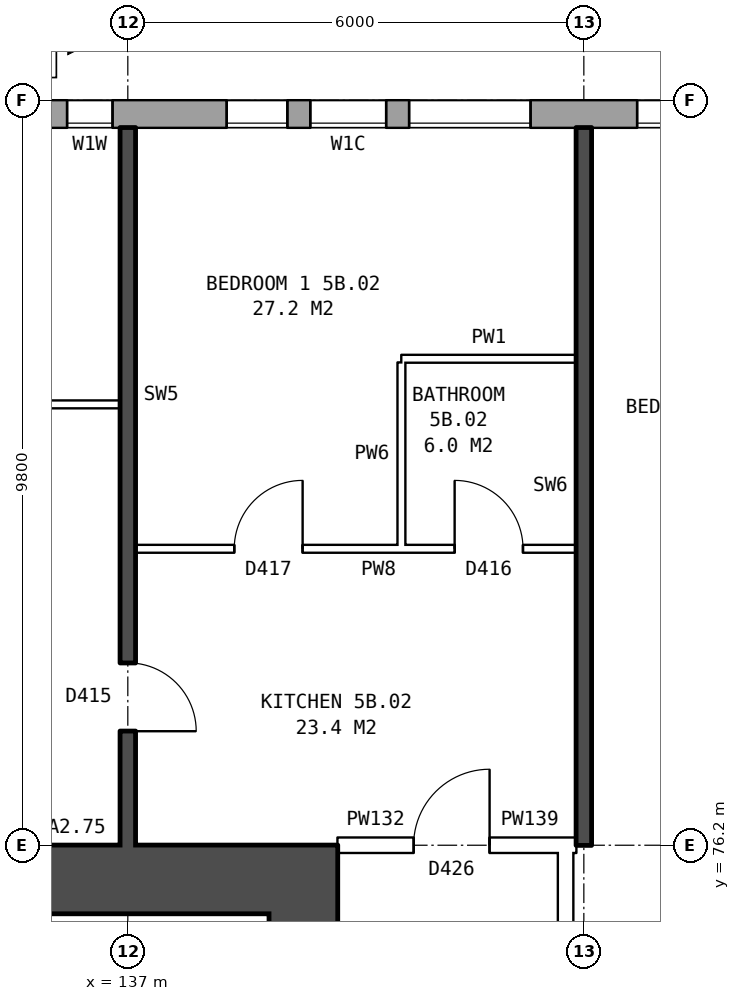
"""IFC4 building model, lengths in metres.
Left out: names, types, materials, properties, quantities, classifications, styles, units other than length and angle.
Written with IfcOpenShell. Run it as: python <this file> out.ifc"""

import sys

from ifc_helpers import new_model, si_unit, direction, frame, frame_2d, origin, place, context, subcontext, project, spatial, rectangle, extrude, element, fill, save


model = new_model("IFC4")
c1 = context("Model", 3, precision=1e-05, world=origin(), true_north=direction((0.0, 1.0)))
c2 = subcontext(c1, "Body", "Model", "MODEL_VIEW")
j1 = project(units=[si_unit("LENGTHUNIT", "METRE"), si_unit("PLANEANGLEUNIT", "RADIAN")], contexts=[c1])
p1 = place(None, origin())
s1 = spatial("IfcSite", under=j1, at=p1, CompositionType="ELEMENT")
p2 = place(p1, origin())
s2 = spatial("IfcBuilding", under=s1, at=p2, CompositionType="ELEMENT")
p3 = place(p2, frame((0.0, 0.0, 22.6)))
s3 = spatial("IfcBuildingStorey", under=s2, at=p3, CompositionType="ELEMENT", Elevation=22.6)
p4 = place(p3, frame((174.675, 85.82, 0.0), z_axis=(0.0, 0.0, 1.0), x_axis=(-1.0, 0.0, 0.0)))
e1 = element("IfcWall", 1, at=p4, inside=s3, PredefinedType="STANDARD", context=c2, shape_type="SweptSolid", body=[
    extrude(rectangle(XDim=40.601, YDim=0.36, at=frame_2d((20.3, 0.0))), origin(), (0.0, 0.0, 1.0), 2.85),
])
p5 = place(p4, frame((1.875, 0.0, 1.7)))
e2 = element("IfcOpeningElement", 2, at=p5, cuts=e1, PredefinedType="OPENING", context=c2, shape_type="SweptSolid", body=[
    extrude(rectangle(XDim=1.0, YDim=0.9, at=frame_2d((0.5, 0.45))), frame((0.0, 0.19, 0.0), z_axis=(0.0, -1.0, 0.0), x_axis=(1.0, 0.0, 0.0)), (0.0, 0.0, 1.0), 0.38),
])
p6 = place(p4, frame((5.375, 0.0, 0.8)))
e3 = element("IfcOpeningElement", 3, at=p6, cuts=e1, PredefinedType="OPENING", context=c2, shape_type="SweptSolid", body=[
    extrude(rectangle(XDim=1.6, YDim=1.8, at=frame_2d((0.8, 0.9))), frame((0.0, 0.19, 0.0), z_axis=(0.0, -1.0, 0.0), x_axis=(1.0, 0.0, 0.0)), (0.0, 0.0, 1.0), 0.38),
])
p7 = place(p4, frame((8.375, 0.0, 0.8)))
e4 = element("IfcOpeningElement", 4, at=p7, cuts=e1, PredefinedType="OPENING", context=c2, shape_type="SweptSolid", body=[
    extrude(rectangle(XDim=1.6, YDim=1.8, at=frame_2d((0.8, 0.9))), frame((0.0, 0.19, 0.0), z_axis=(0.0, -1.0, 0.0), x_axis=(1.0, 0.0, 0.0)), (0.0, 0.0, 1.0), 0.38),
])
p8 = place(p4, frame((11.375, 0.0, 0.8)))
e5 = element("IfcOpeningElement", 5, at=p8, cuts=e1, PredefinedType="OPENING", context=c2, shape_type="SweptSolid", body=[
    extrude(rectangle(XDim=1.6, YDim=1.8, at=frame_2d((0.8, 0.9))), frame((0.0, 0.19, 0.0), z_axis=(0.0, -1.0, 0.0), x_axis=(1.0, 0.0, 0.0)), (0.0, 0.0, 1.0), 0.38),
])
p9 = place(p4, frame((14.375, 0.0, 0.8)))
e6 = element("IfcOpeningElement", 6, at=p9, cuts=e1, PredefinedType="OPENING", context=c2, shape_type="SweptSolid", body=[
    extrude(rectangle(XDim=1.6, YDim=1.8, at=frame_2d((0.8, 0.9))), frame((0.0, 0.19, 0.0), z_axis=(0.0, -1.0, 0.0), x_axis=(1.0, 0.0, 0.0)), (0.0, 0.0, 1.0), 0.38),
])
p10 = place(p4, frame((17.375, 0.0, 0.8)))
e7 = element("IfcOpeningElement", 7, at=p10, cuts=e1, PredefinedType="OPENING", context=c2, shape_type="SweptSolid", body=[
    extrude(rectangle(XDim=1.6, YDim=1.8, at=frame_2d((0.8, 0.9))), frame((0.0, 0.19, 0.0), z_axis=(0.0, -1.0, 0.0), x_axis=(1.0, 0.0, 0.0)), (0.0, 0.0, 1.0), 0.38),
])
p11 = place(p4, frame((20.375, 0.0, 0.8)))
e8 = element("IfcOpeningElement", 8, at=p11, cuts=e1, PredefinedType="OPENING", context=c2, shape_type="SweptSolid", body=[
    extrude(rectangle(XDim=1.6, YDim=1.8, at=frame_2d((0.8, 0.9))), frame((0.0, 0.19, 0.0), z_axis=(0.0, -1.0, 0.0), x_axis=(1.0, 0.0, 0.0)), (0.0, 0.0, 1.0), 0.38),
])
p12 = place(p4, frame((23.375, 0.0, 0.8)))
e9 = element("IfcOpeningElement", 9, at=p12, cuts=e1, PredefinedType="OPENING", context=c2, shape_type="SweptSolid", body=[
    extrude(rectangle(XDim=1.6, YDim=1.8, at=frame_2d((0.8, 0.9))), frame((0.0, 0.19, 0.0), z_axis=(0.0, -1.0, 0.0), x_axis=(1.0, 0.0, 0.0)), (0.0, 0.0, 1.0), 0.38),
])
p13 = place(p4, frame((26.375, 0.0, 0.8)))
e10 = element("IfcOpeningElement", 10, at=p13, cuts=e1, PredefinedType="OPENING", context=c2, shape_type="SweptSolid", body=[
    extrude(rectangle(XDim=1.6, YDim=1.8, at=frame_2d((0.8, 0.9))), frame((0.0, 0.19, 0.0), z_axis=(0.0, -1.0, 0.0), x_axis=(1.0, 0.0, 0.0)), (0.0, 0.0, 1.0), 0.38),
])
p14 = place(p4, frame((29.375, 0.0, 0.8)))
e11 = element("IfcOpeningElement", 11, at=p14, cuts=e1, PredefinedType="OPENING", context=c2, shape_type="SweptSolid", body=[
    extrude(rectangle(XDim=1.6, YDim=1.8, at=frame_2d((0.8, 0.9))), frame((0.0, 0.19, 0.0), z_axis=(0.0, -1.0, 0.0), x_axis=(1.0, 0.0, 0.0)), (0.0, 0.0, 1.0), 0.38),
])
p15 = place(p4, frame((32.375, 0.0, 0.8)))
e12 = element("IfcOpeningElement", 12, at=p15, cuts=e1, PredefinedType="OPENING", context=c2, shape_type="SweptSolid", body=[
    extrude(rectangle(XDim=1.6, YDim=1.8, at=frame_2d((0.8, 0.9))), frame((0.0, 0.19, 0.0), z_axis=(0.0, -1.0, 0.0), x_axis=(1.0, 0.0, 0.0)), (0.0, 0.0, 1.0), 0.38),
])
p16 = place(p4, frame((34.275, 0.0, 0.8)))
e13 = element("IfcOpeningElement", 13, at=p16, cuts=e1, PredefinedType="OPENING", context=c2, shape_type="SweptSolid", body=[
    extrude(rectangle(XDim=1.0, YDim=1.8, at=frame_2d((0.5, 0.9))), frame((0.0, 0.19, 0.0), z_axis=(0.0, -1.0, 0.0), x_axis=(1.0, 0.0, 0.0)), (0.0, 0.0, 1.0), 0.38),
])
p17 = place(p4, frame((37.875, 0.0, 1.6)))
e14 = element("IfcOpeningElement", 14, at=p17, cuts=e1, PredefinedType="OPENING", context=c2, shape_type="SweptSolid", body=[
    extrude(rectangle(XDim=0.6, YDim=0.9, at=frame_2d((0.3, 0.45))), frame((0.0, 0.19, 0.0), z_axis=(0.0, -1.0, 0.0), x_axis=(1.0, 0.0, 0.0)), (0.0, 0.0, 1.0), 0.38),
])
p18 = place(p4, frame((4.125, 0.0, 0.8)))
e15 = element("IfcOpeningElement", 15, at=p18, cuts=e1, PredefinedType="OPENING", context=c2, shape_type="SweptSolid", body=[
    extrude(rectangle(XDim=0.8, YDim=0.9, at=frame_2d((0.4, 0.45))), frame((0.0, 0.19, 0.0), z_axis=(0.0, -1.0, 0.0), x_axis=(1.0, 0.0, 0.0)), (0.0, 0.0, 1.0), 0.38),
])
p19 = place(p4, frame((35.575, 0.0, 0.8)))
e16 = element("IfcOpeningElement", 16, at=p19, cuts=e1, PredefinedType="OPENING", context=c2, shape_type="SweptSolid", body=[
    extrude(rectangle(XDim=0.8, YDim=0.9, at=frame_2d((0.4, 0.45))), frame((0.0, 0.19, 0.0), z_axis=(0.0, -1.0, 0.0), x_axis=(1.0, 0.0, 0.0)), (0.0, 0.0, 1.0), 0.38),
])
p20 = place(p4, frame((38.875, 0.0, 0.8)))
e17 = element("IfcOpeningElement", 17, at=p20, cuts=e1, PredefinedType="OPENING", context=c2, shape_type="SweptSolid", body=[
    extrude(rectangle(XDim=1.4, YDim=1.8, at=frame_2d((0.7, 0.9))), frame((0.0, 0.19, 0.0), z_axis=(0.0, -1.0, 0.0), x_axis=(1.0, 0.0, 0.0)), (0.0, 0.0, 1.0), 0.38),
])
p21 = place(p3, frame((139.31, 64.7, 0.0), z_axis=(0.0, 0.0, 1.0), x_axis=(0.0, 1.0, 0.0)))
e18 = element("IfcWall", 18, at=p21, inside=s3, PredefinedType="SHEAR", context=c2, shape_type="SweptSolid", body=[
    extrude(rectangle(XDim=10.6, YDim=0.9, at=frame_2d((5.3, 0.0))), origin(), (0.0, 0.0, 1.0), 2.85),
])
p22 = place(p21, frame((0.425, 0.0, 0.0)))
e19 = element("IfcOpeningElement", 19, at=p22, cuts=e18, PredefinedType="OPENING", context=c2, shape_type="SweptSolid", body=[
    extrude(rectangle(XDim=1.1, YDim=2.1, at=frame_2d((0.55, 1.05))), frame((0.0, 0.46, 0.0), z_axis=(0.0, -1.0, 0.0), x_axis=(1.0, 0.0, 0.0)), (0.0, 0.0, 1.0), 0.92),
])
p23 = place(p21, frame((9.0, 0.0, 0.0)))
e20 = element("IfcOpeningElement", 20, at=p23, cuts=e18, PredefinedType="OPENING", context=c2, shape_type="SweptSolid", body=[
    extrude(rectangle(XDim=1.1, YDim=2.1, at=frame_2d((0.55, 1.05))), frame((0.0, 0.46, 0.0), z_axis=(0.0, -1.0, 0.0), x_axis=(1.0, 0.0, 0.0)), (0.0, 0.0, 1.0), 0.92),
])
p24 = place(p21, frame((7.225, 0.0, 0.0)))
e21 = element("IfcOpeningElement", 21, at=p24, cuts=e18, PredefinedType="OPENING", context=c2, shape_type="SweptSolid", body=[
    extrude(rectangle(XDim=0.85, YDim=2.1, at=frame_2d((0.425, 1.05))), frame((0.0, 0.46, 0.0), z_axis=(0.0, -1.0, 0.0), x_axis=(1.0, 0.0, 0.0)), (0.0, 0.0, 1.0), 0.92),
])
p25 = place(p3, frame((139.76, 75.75, 0.0), z_axis=(0.0, 0.0, 1.0), x_axis=(-1.0, 0.0, 0.0)))
e22 = element("IfcWall", 22, at=p25, inside=s3, PredefinedType="SHEAR", context=c2, shape_type="SweptSolid", body=[
    extrude(rectangle(XDim=8.4, YDim=0.9, at=frame_2d((4.2, 0.0))), origin(), (0.0, 0.0, 1.0), 2.85),
])
p26 = place(p3, frame((142.76, 63.9, 0.0), z_axis=(0.0, 0.0, 1.0), x_axis=(0.0, 1.0, 0.0)))
e23 = element("IfcWall", 23, at=p26, inside=s3, PredefinedType="PARTITIONING", context=c2, shape_type="SweptSolid", body=[
    extrude(rectangle(XDim=12.2, YDim=0.2, at=frame_2d((6.1, 0.0))), origin(), (0.0, 0.0, 1.0), 2.85),
])
p27 = place(p26, frame((5.1, 0.0, 0.0)))
e24 = element("IfcOpeningElement", 24, at=p27, cuts=e23, PredefinedType="OPENING", context=c2, shape_type="SweptSolid", body=[
    extrude(rectangle(XDim=2.0, YDim=2.1, at=frame_2d((1.0, 1.05))), frame((0.0, 0.11, 0.0), z_axis=(0.0, -1.0, 0.0), x_axis=(1.0, 0.0, 0.0)), (0.0, 0.0, 1.0), 0.22),
])
p28 = place(p3, frame((139.76, 76.2, 0.0), z_axis=(0.0, 0.0, 1.0), x_axis=(1.0, 0.0, 0.0)))
e25 = element("IfcWall", 25, at=p28, inside=s3, PredefinedType="PARTITIONING", context=c2, shape_type="SweptSolid", body=[
    extrude(rectangle(XDim=3.0, YDim=0.2, at=frame_2d((1.5, 0.0))), origin(), (0.0, 0.0, 1.0), 2.85),
])
p29 = place(p28, frame((1.0, 0.0, 0.0)))
e26 = element("IfcOpeningElement", 26, at=p29, cuts=e25, PredefinedType="OPENING", context=c2, shape_type="SweptSolid", body=[
    extrude(rectangle(XDim=1.0, YDim=2.1, at=frame_2d((0.5, 1.05))), frame((0.0, 0.11, 0.0), z_axis=(0.0, -1.0, 0.0), x_axis=(1.0, 0.0, 0.0)), (0.0, 0.0, 1.0), 0.22),
])
p30 = place(p3, frame((142.76, 76.2, 0.0), z_axis=(0.0, 0.0, 1.0), x_axis=(1.0, 0.0, 0.0)))
e27 = element("IfcWall", 27, at=p30, inside=s3, PredefinedType="PARTITIONING", context=c2, shape_type="SweptSolid", body=[
    extrude(rectangle(XDim=0.14, YDim=0.2, at=frame_2d((0.07, 0.0))), origin(), (0.0, 0.0, 1.0), 2.85),
])
p31 = place(p3, frame((137.1, 80.1, 0.0), z_axis=(0.0, 0.0, 1.0), x_axis=(1.0, 0.0, 0.0)))
e28 = element("IfcWall", 28, at=p31, inside=s3, PredefinedType="PARTITIONING", context=c2, shape_type="SweptSolid", body=[
    extrude(rectangle(XDim=5.8, YDim=0.1, at=frame_2d((2.9, 0.0))), origin(), (0.0, 0.0, 1.0), 2.85),
])
p32 = place(p31, frame((1.3, 0.0, 0.0)))
e29 = element("IfcOpeningElement", 29, at=p32, cuts=e28, PredefinedType="OPENING", context=c2, shape_type="SweptSolid", body=[
    extrude(rectangle(XDim=0.9, YDim=2.1, at=frame_2d((0.45, 1.05))), frame((0.0, 0.06, 0.0), z_axis=(0.0, -1.0, 0.0), x_axis=(1.0, 0.0, 0.0)), (0.0, 0.0, 1.0), 0.12),
])
p33 = place(p31, frame((4.2, 0.0, 0.0)))
e30 = element("IfcOpeningElement", 30, at=p33, cuts=e28, PredefinedType="OPENING", context=c2, shape_type="SweptSolid", body=[
    extrude(rectangle(XDim=0.9, YDim=2.1, at=frame_2d((0.45, 1.05))), frame((0.0, 0.06, 0.0), z_axis=(0.0, -1.0, 0.0), x_axis=(1.0, 0.0, 0.0)), (0.0, 0.0, 1.0), 0.12),
])
p34 = place(p3, frame((131.36, 82.0, 0.0), z_axis=(0.0, 0.0, 1.0), x_axis=(1.0, 0.0, 0.0)))
e31 = element("IfcWall", 31, at=p34, inside=s3, PredefinedType="PARTITIONING", context=c2, shape_type="SweptSolid", body=[
    extrude(rectangle(XDim=5.54, YDim=0.1, at=frame_2d((2.77, 0.0))), origin(), (0.0, 0.0, 1.0), 2.85),
])
p35 = place(p34, frame((2.32, 0.0, 0.0)))
e32 = element("IfcOpeningElement", 32, at=p35, cuts=e31, PredefinedType="OPENING", context=c2, shape_type="SweptSolid", body=[
    extrude(rectangle(XDim=0.9, YDim=2.1, at=frame_2d((0.45, 1.05))), frame((0.0, 0.06, 0.0), z_axis=(0.0, -1.0, 0.0), x_axis=(1.0, 0.0, 0.0)), (0.0, 0.0, 1.0), 0.12),
])
p36 = place(p3, frame((140.6, 82.6, 0.0), z_axis=(0.0, 0.0, 1.0), x_axis=(1.0, 0.0, 0.0)))
e33 = element("IfcWall", 33, at=p36, inside=s3, PredefinedType="PARTITIONING", context=c2, shape_type="SweptSolid", body=[
    extrude(rectangle(XDim=2.3, YDim=0.1, at=frame_2d((1.15, 0.0))), origin(), (0.0, 0.0, 1.0), 2.85),
])
p37 = place(p3, frame((137.0, 76.2, 0.0), z_axis=(0.0, 0.0, 1.0), x_axis=(0.0, 1.0, 0.0)))
e34 = element("IfcWall", 34, at=p37, inside=s3, PredefinedType="SOLIDWALL", context=c2, shape_type="SweptSolid", body=[
    extrude(rectangle(XDim=9.44, YDim=0.2, at=frame_2d((4.72, 0.0))), origin(), (0.0, 0.0, 1.0), 2.85),
])
p38 = place(p37, frame((1.5, 0.0, 0.0)))
e35 = element("IfcOpeningElement", 35, at=p38, cuts=e34, PredefinedType="OPENING", context=c2, shape_type="SweptSolid", body=[
    extrude(rectangle(XDim=0.9, YDim=2.1, at=frame_2d((0.45, 1.05))), frame((0.0, 0.11, 0.0), z_axis=(0.0, -1.0, 0.0), x_axis=(1.0, 0.0, 0.0)), (0.0, 0.0, 1.0), 0.22),
])
p39 = place(p3, frame((140.6, 80.15, 0.0), z_axis=(0.0, 0.0, 1.0), x_axis=(0.0, 1.0, 0.0)))
e36 = element("IfcWall", 36, at=p39, inside=s3, PredefinedType="PARTITIONING", context=c2, shape_type="SweptSolid", body=[
    extrude(rectangle(XDim=2.4, YDim=0.1, at=frame_2d((1.2, 0.0))), origin(), (0.0, 0.0, 1.0), 2.85),
])
p40 = place(p3, frame((143.0, 76.2, 0.0), z_axis=(0.0, 0.0, 1.0), x_axis=(0.0, 1.0, 0.0)))
e37 = element("IfcWall", 37, at=p40, inside=s3, PredefinedType="SOLIDWALL", context=c2, shape_type="SweptSolid", body=[
    extrude(rectangle(XDim=9.44, YDim=0.2, at=frame_2d((4.72, 0.0))), origin(), (0.0, 0.0, 1.0), 2.85),
])
p41 = place(p14, origin())
e38 = element("IfcWindow", 38, at=p41, inside=s3, PartitioningType="SINGLE_PANEL", PredefinedType="WINDOW", context=c2, shape_type="SweptSolid", body=[
    extrude(rectangle(XDim=1.6, YDim=1.8, at=frame_2d((0.8, 0.9))), frame((0.0, 0.15, 0.0), z_axis=(0.0, -1.0, 0.0), x_axis=(1.0, 0.0, 0.0)), (0.0, 0.0, 1.0), 0.06),
])
fill(e11, e38)
p42 = place(p15, origin())
e39 = element("IfcWindow", 39, at=p42, inside=s3, PartitioningType="SINGLE_PANEL", PredefinedType="WINDOW", context=c2, shape_type="SweptSolid", body=[
    extrude(rectangle(XDim=1.6, YDim=1.8, at=frame_2d((0.8, 0.9))), frame((0.0, 0.15, 0.0), z_axis=(0.0, -1.0, 0.0), x_axis=(1.0, 0.0, 0.0)), (0.0, 0.0, 1.0), 0.06),
])
fill(e12, e39)
p43 = place(p16, origin())
e40 = element("IfcWindow", 40, at=p43, inside=s3, PartitioningType="SINGLE_PANEL", PredefinedType="WINDOW", context=c2, shape_type="SweptSolid", body=[
    extrude(rectangle(XDim=1.0, YDim=1.8, at=frame_2d((0.5, 0.9))), frame((0.0, 0.15, 0.0), z_axis=(0.0, -1.0, 0.0), x_axis=(1.0, 0.0, 0.0)), (0.0, 0.0, 1.0), 0.06),
])
fill(e13, e40)
p44 = place(p17, origin())
e41 = element("IfcWindow", 41, at=p44, inside=s3, PartitioningType="SINGLE_PANEL", PredefinedType="WINDOW", context=c2, shape_type="SweptSolid", body=[
    extrude(rectangle(XDim=0.6, YDim=0.9, at=frame_2d((0.3, 0.45))), frame((0.0, 0.15, 0.0), z_axis=(0.0, -1.0, 0.0), x_axis=(1.0, 0.0, 0.0)), (0.0, 0.0, 1.0), 0.06),
])
fill(e14, e41)
p45 = place(p32, origin())
e42 = element("IfcDoor", 42, at=p45, inside=s3, OperationType="SINGLE_SWING_RIGHT", PredefinedType="DOOR", context=c2, shape_type="SweptSolid", body=[
    extrude(rectangle(XDim=0.9, YDim=2.1, at=frame_2d((0.45, 1.05))), frame((0.0, 0.025, 0.0), z_axis=(0.0, -1.0, 0.0), x_axis=(1.0, 0.0, 0.0)), (0.0, 0.0, 1.0), 0.05),
])
fill(e29, e42)
p46 = place(p29, origin())
e43 = element("IfcDoor", 43, at=p46, inside=s3, OperationType="SINGLE_SWING_RIGHT", PredefinedType="DOOR", context=c2, shape_type="SweptSolid", body=[
    extrude(rectangle(XDim=1.0, YDim=2.1, at=frame_2d((0.5, 1.05))), frame((0.0, 0.025, 0.0), z_axis=(0.0, -1.0, 0.0), x_axis=(1.0, 0.0, 0.0)), (0.0, 0.0, 1.0), 0.05),
])
fill(e26, e43)
p47 = place(p38, frame((0.9, 0.0, 0.0), z_axis=(0.0, 0.0, 1.0), x_axis=(-1.0, 0.0, 0.0)))
e44 = element("IfcDoor", 44, at=p47, inside=s3, OperationType="SINGLE_SWING_RIGHT", PredefinedType="DOOR", context=c2, shape_type="SweptSolid", body=[
    extrude(rectangle(XDim=0.9, YDim=2.1, at=frame_2d((0.45, 1.05))), frame((0.0, 0.025, 0.0), z_axis=(0.0, -1.0, 0.0), x_axis=(1.0, 0.0, 0.0)), (0.0, 0.0, 1.0), 0.05),
])
fill(e35, e44)
p48 = place(p33, origin())
e45 = element("IfcDoor", 45, at=p48, inside=s3, OperationType="SINGLE_SWING_LEFT", PredefinedType="DOOR", context=c2, shape_type="SweptSolid", body=[
    extrude(rectangle(XDim=0.9, YDim=2.1, at=frame_2d((0.45, 1.05))), frame((0.0, 0.025, 0.0), z_axis=(0.0, -1.0, 0.0), x_axis=(1.0, 0.0, 0.0)), (0.0, 0.0, 1.0), 0.05),
])
fill(e30, e45)
p49 = place(p19, origin())
e46 = element("IfcWindow", 46, at=p49, inside=s3, PartitioningType="SINGLE_PANEL", PredefinedType="WINDOW", context=c2, shape_type="SweptSolid", body=[
    extrude(rectangle(XDim=0.8, YDim=0.9, at=frame_2d((0.4, 0.45))), frame((0.0, 0.15, 0.0), z_axis=(0.0, -1.0, 0.0), x_axis=(1.0, 0.0, 0.0)), (0.0, 0.0, 1.0), 0.06),
])
fill(e16, e46)
save(model, sys.argv[1])
